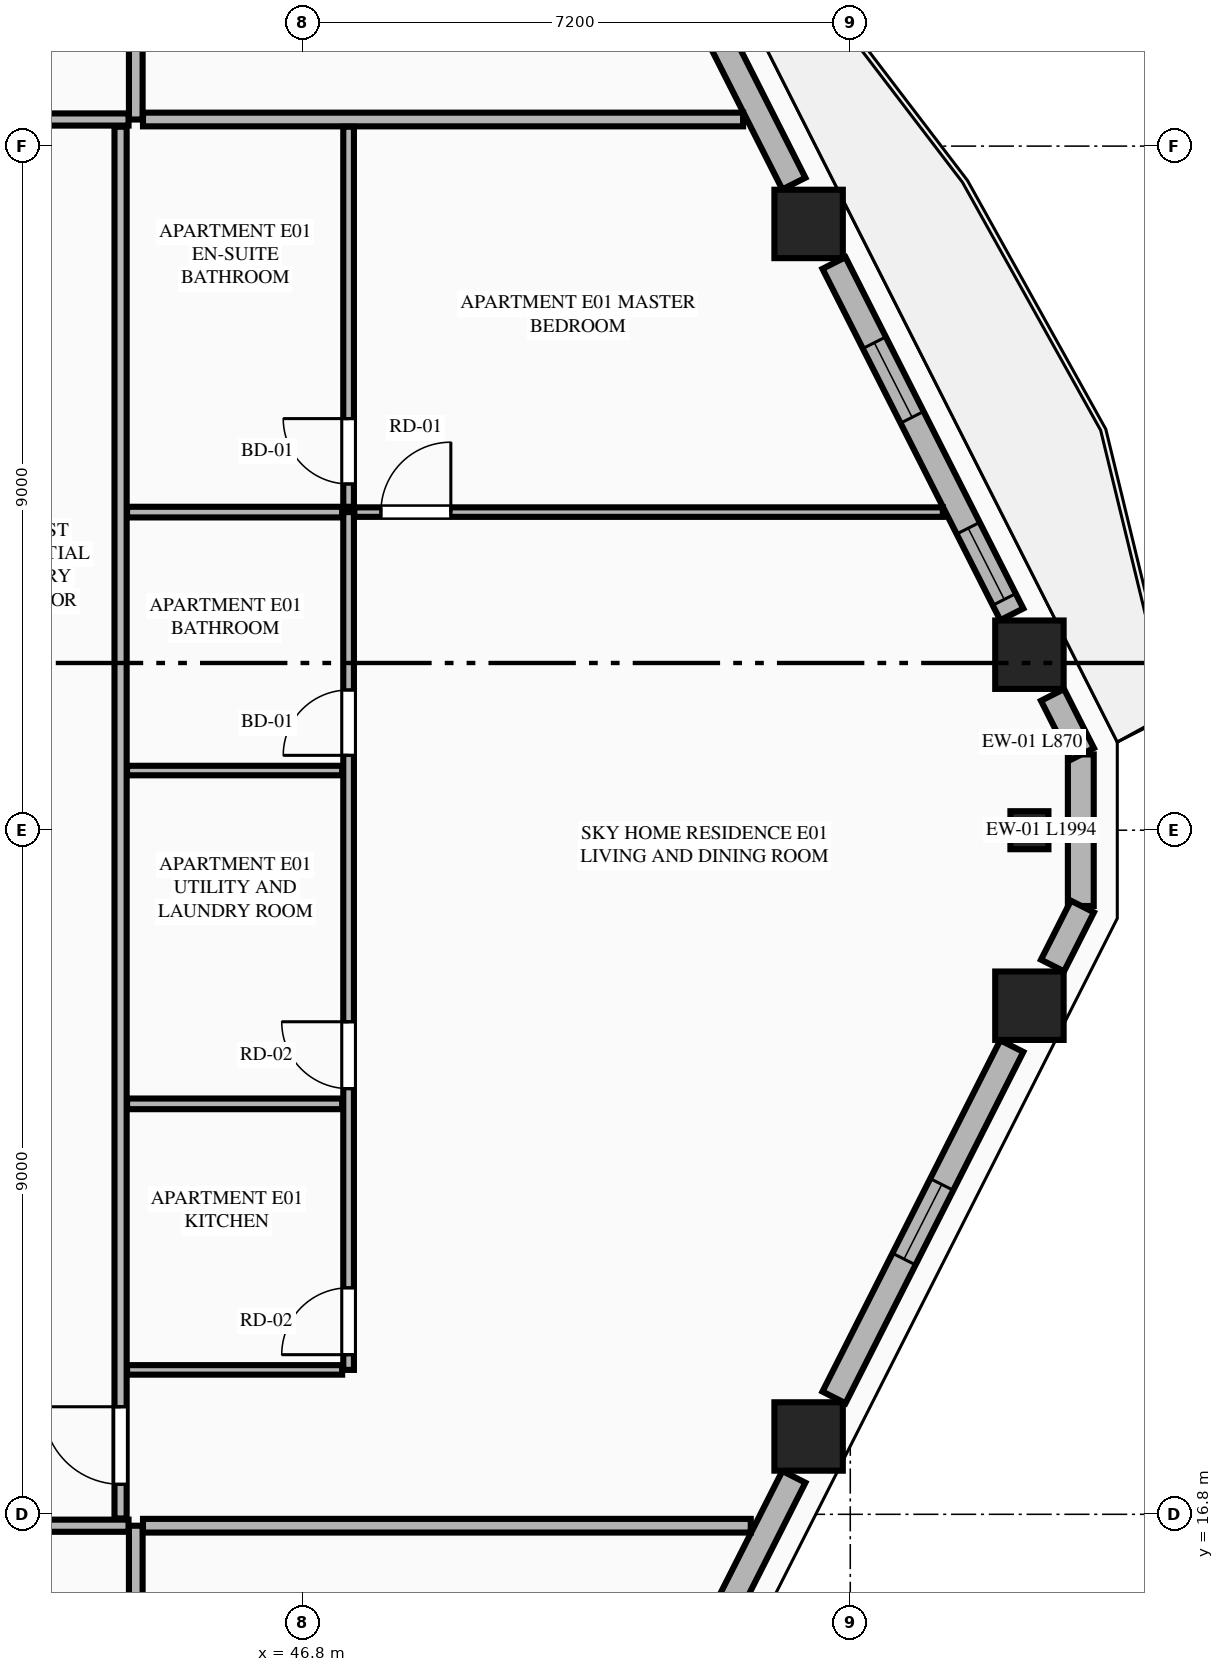
"""IFC4 building model, lengths in metres.
Left out: names, types, materials, properties, quantities, classifications, styles, units other than length and angle.
Written with IfcOpenShell. Run it as: python <this file> out.ifc"""

import sys

from ifc_helpers import new_model, si_unit, direction, frame, frame_2d, origin, origin_2d, place, context, subcontext, project, spatial, rectangle, extrude, element, fill, save


model = new_model("IFC4")
c1 = context("Model", 3, precision=1e-05, world=origin(), true_north=direction((0.0, 1.0)))
c2 = subcontext(c1, "Body", "Model", "MODEL_VIEW")
j1 = project(units=[si_unit("LENGTHUNIT", "METRE"), si_unit("PLANEANGLEUNIT", "RADIAN")], contexts=[c1])
p1 = place(None, origin())
s1 = spatial("IfcSite", under=j1, at=p1, CompositionType="ELEMENT")
p2 = place(p1, origin())
s2 = spatial("IfcBuilding", under=s1, at=p2, CompositionType="ELEMENT")
p3 = place(p2, frame((0.0, 0.0, 153.5)))
s3 = spatial("IfcBuildingStorey", under=s2, at=p3, CompositionType="ELEMENT", Elevation=153.5)
for number, where, z_axis, x_axis in (
    (1, (53.452, 17.824, 0.0), (0.0, 0.0, 1.0), (1.0, 0.0, 0.0)),
    (2, (56.357, 23.491, 0.0), (0.0, 0.0, 1.0), (1.0, 0.0, 0.0)),
    (3, (56.357, 28.109, 0.0), (0.0, 0.0, 1.0), (1.0, 0.0, 0.0)),
    (4, (53.452, 33.776, 0.0), (0.0, 0.0, 1.0), (1.0, 0.0, 0.0)),
):
    element("IfcColumn", number, at=place(p3, frame(where, z_axis=z_axis, x_axis=x_axis)), inside=s3, PredefinedType="COLUMN", context=c2, shape_type="SweptSolid", body=[
        extrude(rectangle(XDim=0.9, YDim=0.9, at=origin_2d()), origin(), (0.0, 0.0, 1.0), 3.55),
    ])
p4 = place(p3, frame((56.357, 25.8, 0.0), z_axis=(0.0, 0.0, 1.0), x_axis=(0.0, 1.0, 0.0)))
e5 = element("IfcColumn", 5, at=p4, inside=s3, PredefinedType="PILASTER", context=c2, shape_type="SweptSolid", body=[
    extrude(rectangle(XDim=0.5, YDim=0.35, at=origin_2d()), origin(), (0.0, 0.0, 1.0), 3.55),
])
p5 = place(p3, frame((57.033, 24.803, 0.0), z_axis=(0.0, 0.0, 1.0), x_axis=(0.0, 1.0, 0.0)))
e6 = element("IfcWall", 6, at=p5, inside=s3, PredefinedType="STANDARD", context=c2, shape_type="SweptSolid", body=[
    extrude(rectangle(XDim=1.994, YDim=0.34, at=frame_2d((0.997, 0.0))), origin(), (0.0, 0.0, 1.0), 3.34),
])
p6 = place(p3, frame((50.818, 12.471, 0.0), z_axis=(0.0, 0.0, 1.0), x_axis=(0.451491174807, 0.892275584711, 0.0)))
e7 = element("IfcWall", 7, at=p6, inside=s3, PredefinedType="STANDARD", context=c2, shape_type="SweptSolid", body=[
    extrude(rectangle(XDim=5.404, YDim=0.34, at=frame_2d((2.702, 0.0))), origin(), (0.0, 0.0, 1.0), 2.797),
])
p7 = place(p6, frame((2.152, 0.0, 0.75)))
e8 = element("IfcOpeningElement", 8, at=p7, cuts=e7, PredefinedType="OPENING", context=c2, shape_type="SweptSolid", body=[
    extrude(rectangle(XDim=1.1, YDim=1.897, at=frame_2d((0.55, 0.948))), frame((0.0, 0.18, 0.0), z_axis=(0.0, -1.0, 0.0), x_axis=(1.0, 0.0, 0.0)), (0.0, 0.0, 1.0), 0.36),
])
p8 = place(p3, frame((53.786, 18.338, 0.0), z_axis=(0.0, 0.0, 1.0), x_axis=(0.451544220963, 0.892248741392, 0.0)))
e9 = element("IfcWall", 9, at=p8, inside=s3, PredefinedType="STANDARD", context=c2, shape_type="SweptSolid", body=[
    extrude(rectangle(XDim=5.18, YDim=0.34, at=frame_2d((2.59, 0.0))), origin(), (0.0, 0.0, 1.0), 2.797),
])
p9 = place(p8, frame((2.04, 0.0, 0.75)))
e10 = element("IfcOpeningElement", 10, at=p9, cuts=e9, PredefinedType="OPENING", context=c2, shape_type="SweptSolid", body=[
    extrude(rectangle(XDim=1.1, YDim=1.897, at=frame_2d((0.55, 0.948))), frame((0.0, 0.18, 0.0), z_axis=(0.0, -1.0, 0.0), x_axis=(1.0, 0.0, 0.0)), (0.0, 0.0, 1.0), 0.36),
])
for number, where, z_axis, x_axis in (
    (11, (56.661, 24.02, 0.0), (0.0, 0.0, 1.0), (0.452, 0.892, 0.0)),
    (12, (57.054, 26.804, 0.0), (0.0, 0.0, 1.0), (-0.452, 0.892, 0.0)),
):
    element("IfcWall", number, at=place(p3, frame(where, z_axis=z_axis, x_axis=x_axis)), inside=s3, PredefinedType="STANDARD", context=c2, shape_type="SweptSolid", body=[
        extrude(rectangle(XDim=0.87, YDim=0.34, at=frame_2d((0.435, 0.0))), origin(), (0.0, 0.0, 1.0), 3.34),
    ])
p10 = place(p3, frame((56.125, 28.64, 0.0), z_axis=(0.0, 0.0, 1.0), x_axis=(-0.451544220963, 0.892248741392, 0.0)))
e13 = element("IfcWall", 13, at=p10, inside=s3, PredefinedType="STANDARD", context=c2, shape_type="SweptSolid", body=[
    extrude(rectangle(XDim=5.18, YDim=0.34, at=frame_2d((2.59, 0.0))), origin(), (0.0, 0.0, 1.0), 2.797),
])
p11 = place(p10, frame((0.22, 0.0, 0.75)))
e14 = element("IfcOpeningElement", 14, at=p11, cuts=e13, PredefinedType="OPENING", context=c2, shape_type="SweptSolid", body=[
    extrude(rectangle(XDim=1.05, YDim=1.897, at=frame_2d((0.525, 0.948))), frame((0.0, 0.18, 0.0), z_axis=(0.0, -1.0, 0.0), x_axis=(1.0, 0.0, 0.0)), (0.0, 0.0, 1.0), 0.36),
])
p12 = place(p10, frame((2.905, 0.0, 0.75)))
e15 = element("IfcOpeningElement", 15, at=p12, cuts=e13, PredefinedType="OPENING", context=c2, shape_type="SweptSolid", body=[
    extrude(rectangle(XDim=1.1, YDim=1.897, at=frame_2d((0.55, 0.948))), frame((0.0, 0.18, 0.0), z_axis=(0.0, -1.0, 0.0), x_axis=(1.0, 0.0, 0.0)), (0.0, 0.0, 1.0), 0.36),
])
p13 = place(p3, frame((53.258, 34.307, 0.0), z_axis=(0.0, 0.0, 1.0), x_axis=(-0.451491174807, 0.892275584711, 0.0)))
e16 = element("IfcWall", 16, at=p13, inside=s3, PredefinedType="STANDARD", context=c2, shape_type="SweptSolid", body=[
    extrude(rectangle(XDim=5.404, YDim=0.34, at=frame_2d((2.702, 0.0))), origin(), (0.0, 0.0, 1.0), 2.797),
])
p14 = place(p13, frame((2.749, 0.0, 0.0)))
e17 = element("IfcOpeningElement", 17, at=p14, cuts=e16, PredefinedType="OPENING", context=c2, shape_type="SweptSolid", body=[
    extrude(rectangle(XDim=1.1, YDim=2.25, at=frame_2d((0.55, 1.125))), frame((0.0, 0.18, 0.0), z_axis=(0.0, -1.0, 0.0), x_axis=(1.0, 0.0, 0.0)), (0.0, 0.0, 1.0), 0.36),
])
p15 = place(p3, frame((44.6, 4.105, 0.0), z_axis=(0.0, 0.0, 1.0), x_axis=(0.0, 1.0, 0.0)))
e18 = element("IfcWall", 18, at=p15, inside=s3, PredefinedType="PARTITIONING", context=c2, shape_type="SweptSolid", body=[
    extrude(rectangle(XDim=12.545, YDim=0.18, at=frame_2d((6.272, 0.0))), origin(), (0.0, 0.0, 1.0), 3.34),
])
p16 = place(p3, frame((36.327, 16.65, 0.0), z_axis=(0.0, 0.0, 1.0), x_axis=(1.0, 0.0, 0.0)))
e19 = element("IfcWall", 19, at=p16, inside=s3, PredefinedType="PARTITIONING", context=c2, shape_type="SweptSolid", body=[
    extrude(rectangle(XDim=8.178, YDim=0.16, at=frame_2d((4.089, 0.0))), origin(), (0.0, 0.0, 1.0), 3.34),
])
p17 = place(p16, frame((5.923, 0.0, 0.0)))
e20 = element("IfcOpeningElement", 20, at=p17, cuts=e19, PredefinedType="OPENING", context=c2, shape_type="SweptSolid", body=[
    extrude(rectangle(XDim=1.02, YDim=2.25, at=frame_2d((0.51, 1.125))), frame((0.0, 0.09, 0.0), z_axis=(0.0, -1.0, 0.0), x_axis=(1.0, 0.0, 0.0)), (0.0, 0.0, 1.0), 0.18),
])
p18 = place(p3, frame((44.6, 35.15, 0.0), z_axis=(0.0, 0.0, 1.0), x_axis=(0.0, 1.0, 0.0)))
e21 = element("IfcWall", 21, at=p18, inside=s3, PredefinedType="PARTITIONING", context=c2, shape_type="SweptSolid", body=[
    extrude(rectangle(XDim=12.345, YDim=0.18, at=frame_2d((6.173, 0.0))), origin(), (0.0, 0.0, 1.0), 3.34),
])
p19 = place(p3, frame((20.295, 35.15, 0.0), z_axis=(0.0, 0.0, 1.0), x_axis=(1.0, 0.0, 0.0)))
e22 = element("IfcWall", 22, at=p19, inside=s3, PredefinedType="PARTITIONING", context=c2, shape_type="SweptSolid", body=[
    extrude(rectangle(XDim=24.21, YDim=0.16, at=frame_2d((12.105, 0.0))), origin(), (0.0, 0.0, 1.0), 3.34),
])
p20 = place(p19, frame((0.405, 0.0, 0.0)))
e23 = element("IfcOpeningElement", 23, at=p20, cuts=e22, PredefinedType="OPENING", context=c2, shape_type="SweptSolid", body=[
    extrude(rectangle(XDim=1.35, YDim=2.35, at=frame_2d((0.675, 1.175))), frame((0.0, 0.09, 0.0), z_axis=(0.0, -1.0, 0.0), x_axis=(1.0, 0.0, 0.0)), (0.0, 0.0, 1.0), 0.18),
])
p21 = place(p3, frame((44.695, 16.65, 0.0), z_axis=(0.0, 0.0, 1.0), x_axis=(1.0, 0.0, 0.0)))
e24 = element("IfcWall", 24, at=p21, inside=s3, PredefinedType="PARTITIONING", context=c2, shape_type="SweptSolid", body=[
    extrude(rectangle(XDim=7.996, YDim=0.18, at=frame_2d((3.998, 0.0))), origin(), (0.0, 0.0, 1.0), 3.34),
])
p22 = place(p3, frame((44.695, 35.15, 0.0), z_axis=(0.0, 0.0, 1.0), x_axis=(1.0, 0.0, 0.0)))
e25 = element("IfcWall", 25, at=p22, inside=s3, PredefinedType="PARTITIONING", context=c2, shape_type="SweptSolid", body=[
    extrude(rectangle(XDim=7.895, YDim=0.18, at=frame_2d((3.948, 0.0))), origin(), (0.0, 0.0, 1.0), 3.34),
])
p23 = place(p3, frame((44.4, 16.745, 0.0), z_axis=(0.0, 0.0, 1.0), x_axis=(0.0, 1.0, 0.0)))
e26 = element("IfcWall", 26, at=p23, inside=s3, PredefinedType="PARTITIONING", context=c2, shape_type="SweptSolid", body=[
    extrude(rectangle(XDim=18.31, YDim=0.16, at=frame_2d((9.155, 0.0))), origin(), (0.0, 0.0, 1.0), 3.34),
])
p24 = place(p23, frame((0.45, 0.0, 0.0)))
e27 = element("IfcOpeningElement", 27, at=p24, cuts=e26, PredefinedType="OPENING", context=c2, shape_type="SweptSolid", body=[
    extrude(rectangle(XDim=1.02, YDim=2.25, at=frame_2d((0.51, 1.125))), frame((0.0, 0.09, 0.0), z_axis=(0.0, -1.0, 0.0), x_axis=(1.0, 0.0, 0.0)), (0.0, 0.0, 1.0), 0.18),
])
p25 = place(p3, frame((44.485, 18.7, 0.0), z_axis=(0.0, 0.0, 1.0), x_axis=(1.0, 0.0, 0.0)))
e28 = element("IfcWall", 28, at=p25, inside=s3, PredefinedType="PARTITIONING", context=c2, shape_type="SweptSolid", body=[
    extrude(rectangle(XDim=2.83, YDim=0.125, at=frame_2d((1.415, 0.0))), origin(), (0.0, 0.0, 1.0), 2.722),
])
p26 = place(p3, frame((47.4, 18.7, 0.0), z_axis=(0.0, 0.0, 1.0), x_axis=(0.0, 1.0, 0.0)))
e29 = element("IfcWall", 29, at=p26, inside=s3, PredefinedType="PLUMBINGWALL", context=c2, shape_type="SweptSolid", body=[
    extrude(rectangle(XDim=11.285, YDim=0.14, at=frame_2d((5.643, 0.0))), origin(), (0.0, 0.0, 1.0), 3.34),
])
p27 = place(p26, frame((0.2, 0.0, 0.0)))
e30 = element("IfcOpeningElement", 30, at=p27, cuts=e29, PredefinedType="OPENING", context=c2, shape_type="SweptSolid", body=[
    extrude(rectangle(XDim=0.88, YDim=2.15, at=frame_2d((0.44, 1.075))), frame((0.0, 0.08, 0.0), z_axis=(0.0, -1.0, 0.0), x_axis=(1.0, 0.0, 0.0)), (0.0, 0.0, 1.0), 0.16),
])
p28 = place(p26, frame((3.7, 0.0, 0.0)))
e31 = element("IfcOpeningElement", 31, at=p28, cuts=e29, PredefinedType="OPENING", context=c2, shape_type="SweptSolid", body=[
    extrude(rectangle(XDim=0.88, YDim=2.15, at=frame_2d((0.44, 1.075))), frame((0.0, 0.08, 0.0), z_axis=(0.0, -1.0, 0.0), x_axis=(1.0, 0.0, 0.0)), (0.0, 0.0, 1.0), 0.16),
])
p29 = place(p26, frame((8.085, 0.0, 0.0)))
e32 = element("IfcOpeningElement", 32, at=p29, cuts=e29, PredefinedType="OPENING", context=c2, shape_type="SweptSolid", body=[
    extrude(rectangle(XDim=0.86, YDim=2.1, at=frame_2d((0.43, 1.05))), frame((0.0, 0.08, 0.0), z_axis=(0.0, -1.0, 0.0), x_axis=(1.0, 0.0, 0.0)), (0.0, 0.0, 1.0), 0.16),
])
p30 = place(p3, frame((47.4, 30.055, 0.0), z_axis=(0.0, 0.0, 1.0), x_axis=(0.0, 1.0, 0.0)))
e33 = element("IfcWall", 33, at=p30, inside=s3, PredefinedType="PLUMBINGWALL", context=c2, shape_type="SweptSolid", body=[
    extrude(rectangle(XDim=5.0, YDim=0.14, at=frame_2d((2.5, 0.0))), origin(), (0.0, 0.0, 1.0), 3.34),
])
p31 = place(p30, frame((0.3, 0.0, 0.0)))
e34 = element("IfcOpeningElement", 34, at=p31, cuts=e33, PredefinedType="OPENING", context=c2, shape_type="SweptSolid", body=[
    extrude(rectangle(XDim=0.86, YDim=2.1, at=frame_2d((0.43, 1.05))), frame((0.0, 0.08, 0.0), z_axis=(0.0, -1.0, 0.0), x_axis=(1.0, 0.0, 0.0)), (0.0, 0.0, 1.0), 0.16),
])
p32 = place(p3, frame((44.485, 29.985, 0.0), z_axis=(0.0, 0.0, 1.0), x_axis=(1.0, 0.0, 0.0)))
e35 = element("IfcWall", 35, at=p32, inside=s3, PredefinedType="PLUMBINGWALL", context=c2, shape_type="SweptSolid", body=[
    extrude(rectangle(XDim=2.83, YDim=0.14, at=frame_2d((1.415, 0.0))), origin(), (0.0, 0.0, 1.0), 3.34),
])
p33 = place(p3, frame((47.475, 29.985, 0.0), z_axis=(0.0, 0.0, 1.0), x_axis=(1.0, 0.0, 0.0)))
e36 = element("IfcWall", 36, at=p33, inside=s3, PredefinedType="PARTITIONING", context=c2, shape_type="SweptSolid", body=[
    extrude(rectangle(XDim=7.743, YDim=0.125, at=frame_2d((3.872, 0.0))), origin(), (0.0, 0.0, 1.0), 3.34),
])
p34 = place(p33, frame((0.35, 0.0, 0.0)))
e37 = element("IfcOpeningElement", 37, at=p34, cuts=e36, PredefinedType="OPENING", context=c2, shape_type="SweptSolid", body=[
    extrude(rectangle(XDim=0.92, YDim=2.15, at=frame_2d((0.46, 1.075))), frame((0.0, 0.073, 0.0), z_axis=(0.0, -1.0, 0.0), x_axis=(1.0, 0.0, 0.0)), (0.0, 0.0, 1.0), 0.145),
])
p35 = place(p3, frame((44.485, 22.2, 0.0), z_axis=(0.0, 0.0, 1.0), x_axis=(1.0, 0.0, 0.0)))
e38 = element("IfcWall", 38, at=p35, inside=s3, PredefinedType="PLUMBINGWALL", context=c2, shape_type="SweptSolid", body=[
    extrude(rectangle(XDim=2.83, YDim=0.14, at=frame_2d((1.415, 0.0))), origin(), (0.0, 0.0, 1.0), 3.34),
])
p36 = place(p3, frame((44.485, 26.585, 0.0), z_axis=(0.0, 0.0, 1.0), x_axis=(1.0, 0.0, 0.0)))
e39 = element("IfcWall", 39, at=p36, inside=s3, PredefinedType="PARTITIONING", context=c2, shape_type="SweptSolid", body=[
    extrude(rectangle(XDim=2.83, YDim=0.125, at=frame_2d((1.415, 0.0))), origin(), (0.0, 0.0, 1.0), 3.34),
])
p37 = place(p9, origin())
e40 = element("IfcWindow", 40, at=p37, inside=s3, PartitioningType="SINGLE_PANEL", PredefinedType="WINDOW", context=c2, shape_type="SweptSolid", body=[
    extrude(rectangle(XDim=1.1, YDim=1.897, at=frame_2d((0.55, 0.948))), frame((0.0, 0.03, 0.0), z_axis=(0.0, -1.0, 0.0), x_axis=(1.0, 0.0, 0.0)), (0.0, 0.0, 1.0), 0.06),
])
fill(e10, e40)
p38 = place(p11, origin())
e41 = element("IfcWindow", 41, at=p38, inside=s3, PartitioningType="SINGLE_PANEL", PredefinedType="WINDOW", context=c2, shape_type="SweptSolid", body=[
    extrude(rectangle(XDim=1.05, YDim=1.897, at=frame_2d((0.525, 0.948))), frame((0.0, 0.03, 0.0), z_axis=(0.0, -1.0, 0.0), x_axis=(1.0, 0.0, 0.0)), (0.0, 0.0, 1.0), 0.06),
])
fill(e14, e41)
p39 = place(p27, origin())
e42 = element("IfcDoor", 42, at=p39, inside=s3, OperationType="SINGLE_SWING_LEFT", PredefinedType="DOOR", context=c2, shape_type="SweptSolid", body=[
    extrude(rectangle(XDim=0.88, YDim=2.15, at=frame_2d((0.44, 1.075))), frame((0.0, 0.025, 0.0), z_axis=(0.0, -1.0, 0.0), x_axis=(1.0, 0.0, 0.0)), (0.0, 0.0, 1.0), 0.05),
])
fill(e30, e42)
p40 = place(p28, origin())
e43 = element("IfcDoor", 43, at=p40, inside=s3, OperationType="SINGLE_SWING_RIGHT", PredefinedType="DOOR", context=c2, shape_type="SweptSolid", body=[
    extrude(rectangle(XDim=0.88, YDim=2.15, at=frame_2d((0.44, 1.075))), frame((0.0, 0.025, 0.0), z_axis=(0.0, -1.0, 0.0), x_axis=(1.0, 0.0, 0.0)), (0.0, 0.0, 1.0), 0.05),
])
fill(e31, e43)
p41 = place(p29, origin())
e44 = element("IfcDoor", 44, at=p41, inside=s3, OperationType="SINGLE_SWING_LEFT", PredefinedType="DOOR", context=c2, shape_type="SweptSolid", body=[
    extrude(rectangle(XDim=0.86, YDim=2.1, at=frame_2d((0.43, 1.05))), frame((0.0, 0.025, 0.0), z_axis=(0.0, -1.0, 0.0), x_axis=(1.0, 0.0, 0.0)), (0.0, 0.0, 1.0), 0.05),
])
fill(e32, e44)
p42 = place(p31, origin())
e45 = element("IfcDoor", 45, at=p42, inside=s3, OperationType="SINGLE_SWING_RIGHT", PredefinedType="DOOR", context=c2, shape_type="SweptSolid", body=[
    extrude(rectangle(XDim=0.86, YDim=2.1, at=frame_2d((0.43, 1.05))), frame((0.0, 0.025, 0.0), z_axis=(0.0, -1.0, 0.0), x_axis=(1.0, 0.0, 0.0)), (0.0, 0.0, 1.0), 0.05),
])
fill(e34, e45)
p43 = place(p24, origin())
e46 = element("IfcDoor", 46, at=p43, inside=s3, OperationType="SINGLE_SWING_RIGHT", PredefinedType="DOOR", context=c2, shape_type="SweptSolid", body=[
    extrude(rectangle(XDim=1.02, YDim=2.25, at=frame_2d((0.51, 1.125))), frame((0.0, 0.025, 0.0), z_axis=(0.0, -1.0, 0.0), x_axis=(1.0, 0.0, 0.0)), (0.0, 0.0, 1.0), 0.05),
])
fill(e27, e46)
p44 = place(p34, origin())
e47 = element("IfcDoor", 47, at=p44, inside=s3, OperationType="SINGLE_SWING_RIGHT", PredefinedType="DOOR", context=c2, shape_type="SweptSolid", body=[
    extrude(rectangle(XDim=0.92, YDim=2.15, at=frame_2d((0.46, 1.075))), frame((0.0, 0.025, 0.0), z_axis=(0.0, -1.0, 0.0), x_axis=(1.0, 0.0, 0.0)), (0.0, 0.0, 1.0), 0.05),
])
fill(e37, e47)
p45 = place(p12, origin())
e48 = element("IfcWindow", 48, at=p45, inside=s3, PartitioningType="SINGLE_PANEL", PredefinedType="WINDOW", context=c2, shape_type="SweptSolid", body=[
    extrude(rectangle(XDim=1.1, YDim=1.897, at=frame_2d((0.55, 0.948))), frame((0.0, 0.03, 0.0), z_axis=(0.0, -1.0, 0.0), x_axis=(1.0, 0.0, 0.0)), (0.0, 0.0, 1.0), 0.06),
])
fill(e15, e48)
save(model, sys.argv[1])
